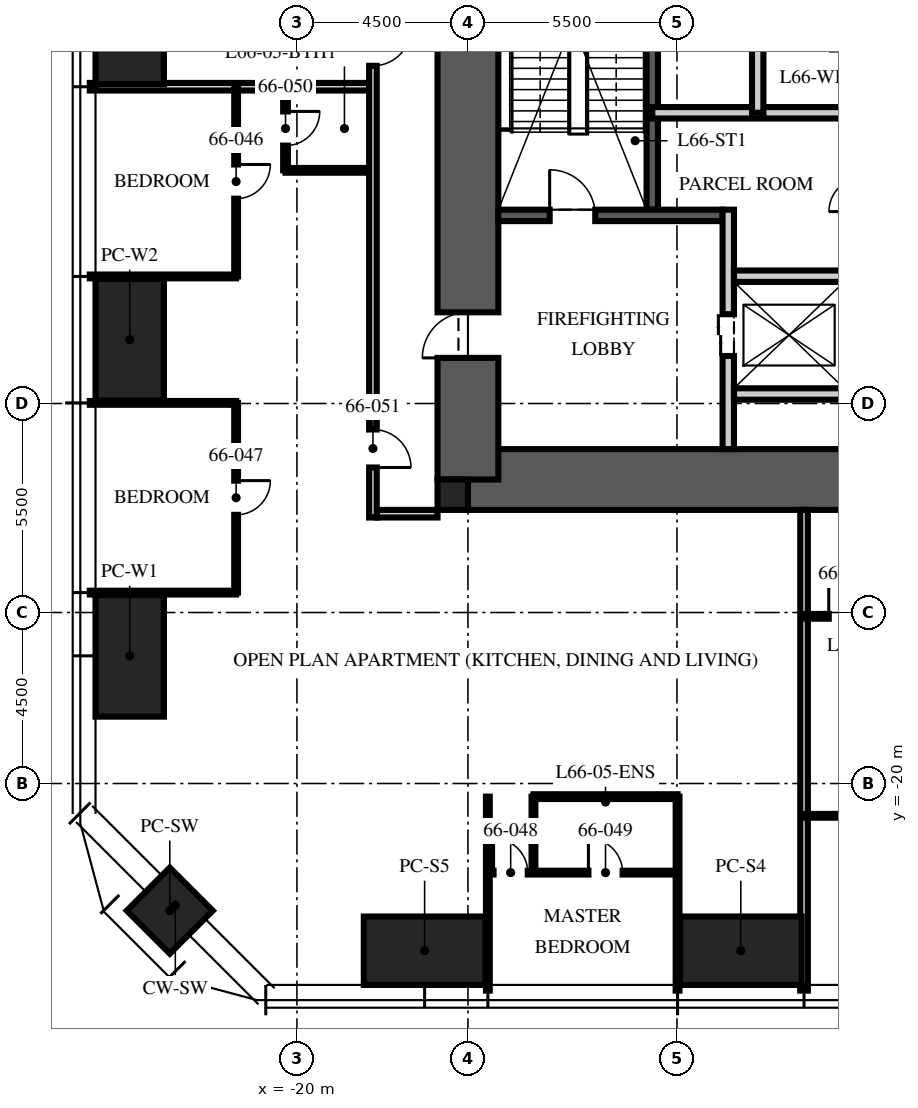
"""IFC4 building model, lengths in metres.
Left out: names, types, materials, properties, quantities, classifications, styles, units other than length and angle.
Written with IfcOpenShell. Run it as: python <this file> out.ifc"""

import sys

from ifc_helpers import new_model, si_unit, direction, frame, frame_2d, origin, origin_2d, place, context, subcontext, project, spatial, rectangle, hollow_rectangle, extrude, element, fill, save


model = new_model("IFC4")
c1 = context("Model", 3, precision=1e-05, world=origin(), true_north=direction((0.0, 1.0)))
c2 = subcontext(c1, "Body", "Model", "MODEL_VIEW")
j1 = project(units=[si_unit("LENGTHUNIT", "METRE"), si_unit("PLANEANGLEUNIT", "RADIAN")], contexts=[c1])
p1 = place(None, origin())
s1 = spatial("IfcSite", under=j1, at=p1, CompositionType="ELEMENT")
p2 = place(p1, origin())
s2 = spatial("IfcBuilding", under=s1, at=p2, CompositionType="ELEMENT")
p3 = place(p2, frame((0.0, 0.0, 263.25)))
s3 = spatial("IfcBuildingStorey", under=s2, at=p3, CompositionType="ELEMENT", Elevation=263.25)
p4 = place(p3, frame((-15.5, -12.0, -0.25), z_axis=(0.0, 0.0, 1.0), x_axis=(1.0, 0.0, 0.0)))
e1 = element("IfcWall", 1, at=p4, inside=s3, PredefinedType="SHEAR", context=c2, shape_type="SweptSolid", body=[
    extrude(rectangle(XDim=31.0, YDim=1.6, at=frame_2d((15.5, 0.0))), origin(), (0.0, 0.0, 1.0), 3.75),
])
p5 = place(p3, frame((-15.5, -12.0, -0.25), z_axis=(0.0, 0.0, 1.0), x_axis=(0.0, 1.0, 0.0)))
e2 = element("IfcWall", 2, at=p5, inside=s3, PredefinedType="SHEAR", context=c2, shape_type="SweptSolid", body=[
    extrude(rectangle(XDim=24.0, YDim=1.6, at=frame_2d((12.0, 0.0))), origin(), (0.0, 0.0, 1.0), 3.75),
])
p6 = place(p5, frame((3.2, 0.0, 0.25)))
e3 = element("IfcOpeningElement", 3, at=p6, cuts=e2, PredefinedType="OPENING", context=c2, shape_type="SweptSolid", body=[
    extrude(rectangle(XDim=1.2, YDim=2.1, at=frame_2d((0.6, 1.05))), frame((0.0, 0.81, 0.0), z_axis=(0.0, -1.0, 0.0), x_axis=(1.0, 0.0, 0.0)), (0.0, 0.0, 1.0), 1.62),
])
p7 = place(p5, frame((19.3, 0.0, 0.25)))
e4 = element("IfcOpeningElement", 4, at=p7, cuts=e2, PredefinedType="OPENING", context=c2, shape_type="SweptSolid", body=[
    extrude(rectangle(XDim=1.8, YDim=2.1, at=frame_2d((0.9, 1.05))), frame((0.0, 0.81, 0.0), z_axis=(0.0, -1.0, 0.0), x_axis=(1.0, 0.0, 0.0)), (0.0, 0.0, 1.0), 1.62),
])
p8 = place(p3, frame((-15.9, -12.4, -0.25), z_axis=(0.0, 0.0, 1.0), x_axis=(1.0, 0.0, 0.0)))
e5 = element("IfcColumn", 5, at=p8, inside=s3, PredefinedType="COLUMN", context=c2, shape_type="SweptSolid", body=[
    extrude(rectangle(XDim=0.8, YDim=0.8, at=origin_2d()), origin(), (0.0, 0.0, 1.0), 3.75),
])
for number, where, z_axis, x_axis in (
    (6, (-8.32, -24.4, 0.0), (0.0, 0.0, 1.0), (1.0, 0.0, 0.0)),
    (7, (-16.64, -24.4, 0.0), (0.0, 0.0, 1.0), (1.0, 0.0, 0.0)),
    (8, (-24.4, -16.64, 0.0), (0.0, 0.0, 1.0), (0.0, 1.0, 0.0)),
    (9, (-24.4, -8.32, 0.0), (0.0, 0.0, 1.0), (0.0, 1.0, 0.0)),
    (10, (-24.4, 0.0, 0.0), (0.0, 0.0, 1.0), (0.0, 1.0, 0.0)),
):
    element("IfcColumn", number, at=place(p3, frame(where, z_axis=z_axis, x_axis=x_axis)), inside=s3, PredefinedType="COLUMN", context=c2, shape_type="SweptSolid", body=[
        extrude(hollow_rectangle(XDim=3.2, YDim=1.8, WallThickness=0.14, at=origin_2d()), origin(), (0.0, 0.0, 1.0), 3.75),
    ])
p9 = place(p3, frame((-23.346, -23.346, 0.0), z_axis=(0.0, 0.0, 1.0), x_axis=(0.707106781187, -0.707106781187, 0.0)))
e11 = element("IfcColumn", 11, at=p9, inside=s3, PredefinedType="COLUMN", context=c2, shape_type="SweptSolid", body=[
    extrude(hollow_rectangle(XDim=1.6, YDim=1.6, WallThickness=0.1, at=origin_2d()), origin(), (0.0, 0.0, 1.0), 3.75),
])
p10 = place(p3, frame((-10.65, -4.9, 0.0), z_axis=(0.0, 0.0, 1.0), x_axis=(0.0, 1.0, 0.0)))
e12 = element("IfcWall", 12, at=p10, inside=s3, PredefinedType="SOLIDWALL", context=c2, shape_type="SweptSolid", body=[
    extrude(rectangle(XDim=10.1, YDim=0.3, at=frame_2d((5.05, 0.0))), origin(), (0.0, 0.0, 1.0), 3.5),
])
p11 = place(p3, frame((-14.7, -5.05, 0.0), z_axis=(0.0, 0.0, 1.0), x_axis=(1.0, 0.0, 0.0)))
e13 = element("IfcWall", 13, at=p11, inside=s3, PredefinedType="SOLIDWALL", context=c2, shape_type="SweptSolid", body=[
    extrude(rectangle(XDim=5.9, YDim=0.3, at=frame_2d((2.95, 0.0))), origin(), (0.0, 0.0, 1.0), 3.5),
])
p12 = place(p11, frame((1.35, 0.0, 0.0)))
e14 = element("IfcOpeningElement", 14, at=p12, cuts=e13, PredefinedType="OPENING", context=c2, shape_type="SweptSolid", body=[
    extrude(rectangle(XDim=1.2, YDim=2.1, at=frame_2d((0.6, 1.05))), frame((0.0, 0.16, 0.0), z_axis=(0.0, -1.0, 0.0), x_axis=(1.0, 0.0, 0.0)), (0.0, 0.0, 1.0), 0.32),
])
p13 = place(p3, frame((-8.65, -11.2, 0.0), z_axis=(0.0, 0.0, 1.0), x_axis=(0.0, 1.0, 0.0)))
e15 = element("IfcWall", 15, at=p13, inside=s3, PredefinedType="PARTITIONING", context=c2, shape_type="SweptSolid", body=[
    extrude(rectangle(XDim=6.3, YDim=0.3, at=frame_2d((3.15, 0.0))), origin(), (0.0, 0.0, 1.0), 3.5),
])
p14 = place(p13, frame((2.45, 0.0, 0.0)))
e16 = element("IfcOpeningElement", 16, at=p14, cuts=e15, PredefinedType="OPENING", context=c2, shape_type="SweptSolid", body=[
    extrude(rectangle(XDim=1.1, YDim=2.1, at=frame_2d((0.55, 1.05))), frame((0.0, 0.16, 0.0), z_axis=(0.0, -1.0, 0.0), x_axis=(1.0, 0.0, 0.0)), (0.0, 0.0, 1.0), 0.32),
])
p15 = place(p3, frame((-8.5, -6.65, 0.0), z_axis=(0.0, 0.0, 1.0), x_axis=(1.0, 0.0, 0.0)))
e17 = element("IfcWall", 17, at=p15, inside=s3, PredefinedType="PARTITIONING", context=c2, shape_type="SweptSolid", body=[
    extrude(rectangle(XDim=17.0, YDim=0.3, at=frame_2d((8.5, 0.0))), origin(), (0.0, 0.0, 1.0), 3.5),
])
p16 = place(p15, frame((7.8, 0.0, 0.0)))
e18 = element("IfcOpeningElement", 18, at=p16, cuts=e17, PredefinedType="OPENING", context=c2, shape_type="SweptSolid", body=[
    extrude(rectangle(XDim=1.3, YDim=2.4, at=frame_2d((0.65, 1.2))), frame((0.0, 0.16, 0.0), z_axis=(0.0, -1.0, 0.0), x_axis=(1.0, 0.0, 0.0)), (0.0, 0.0, 1.0), 0.32),
])
p17 = place(p15, frame((5.65, 0.0, 0.0)))
e19 = element("IfcOpeningElement", 19, at=p17, cuts=e17, PredefinedType="OPENING", context=c2, shape_type="SweptSolid", body=[
    extrude(rectangle(XDim=0.9, YDim=2.1, at=frame_2d((0.45, 1.05))), frame((0.0, 0.16, 0.0), z_axis=(0.0, -1.0, 0.0), x_axis=(1.0, 0.0, 0.0)), (0.0, 0.0, 1.0), 0.32),
])
p18 = place(p15, frame((10.4, 0.0, 0.0)))
e20 = element("IfcOpeningElement", 20, at=p18, cuts=e17, PredefinedType="OPENING", context=c2, shape_type="SweptSolid", body=[
    extrude(rectangle(XDim=0.9, YDim=2.1, at=frame_2d((0.45, 1.05))), frame((0.0, 0.16, 0.0), z_axis=(0.0, -1.0, 0.0), x_axis=(1.0, 0.0, 0.0)), (0.0, 0.0, 1.0), 0.32),
])
p19 = place(p3, frame((-8.5, -9.75, 0.0), z_axis=(0.0, 0.0, 1.0), x_axis=(1.0, 0.0, 0.0)))
e21 = element("IfcWall", 21, at=p19, inside=s3, PredefinedType="PARTITIONING", context=c2, shape_type="SweptSolid", body=[
    extrude(rectangle(XDim=2.9, YDim=0.3, at=frame_2d((1.45, 0.0))), origin(), (0.0, 0.0, 1.0), 3.5),
])
p20 = place(p3, frame((-10.65, -2.35, 0.0), z_axis=(0.0, 0.0, 1.0), x_axis=(1.0, 0.0, 0.0)))
e22 = element("IfcWall", 22, at=p20, inside=s3, PredefinedType="PARTITIONING", context=c2, shape_type="SweptSolid", body=[
    extrude(rectangle(XDim=5.55, YDim=0.3, at=frame_2d((2.775, 0.0))), origin(), (0.0, 0.0, 1.0), 3.5),
])
p21 = place(p3, frame((-7.875, -2.35, 0.0), z_axis=(0.0, 0.0, 1.0), x_axis=(0.0, 1.0, 0.0)))
e23 = element("IfcWall", 23, at=p21, inside=s3, PredefinedType="PARTITIONING", context=c2, shape_type="SweptSolid", body=[
    extrude(rectangle(XDim=4.15, YDim=0.3, at=frame_2d((2.075, 0.0))), origin(), (0.0, 0.0, 1.0), 3.5),
])
p22 = place(p3, frame((-16.3, -12.9, 0.0), z_axis=(0.0, 0.0, 1.0), x_axis=(-1.0, 0.0, 0.0)))
e24 = element("IfcWall", 24, at=p22, inside=s3, PredefinedType="PARTITIONING", context=c2, shape_type="SweptSolid", body=[
    extrude(rectangle(XDim=1.6, YDim=0.2, at=frame_2d((0.8, 0.0))), origin(), (0.0, 0.0, 1.0), 2.3),
])
p23 = place(p3, frame((-18.1, -1.664, 0.0), z_axis=(0.0, 0.0, 1.0), x_axis=(-1.0, 0.0, 0.0)))
e25 = element("IfcWall", 25, at=p23, inside=s3, PredefinedType="PARTITIONING", context=c2, shape_type="SweptSolid", body=[
    extrude(rectangle(XDim=7.35, YDim=0.2, at=frame_2d((3.675, 0.0))), origin(), (0.0, 0.0, 1.0), 2.91),
])
for number, where, z_axis, x_axis in (
    (26, (-21.6, -6.656, 0.0), (0.0, 0.0, 1.0), (-1.0, 0.0, 0.0)),
    (27, (-21.6, -9.984, 0.0), (0.0, 0.0, 1.0), (-1.0, 0.0, 0.0)),
    (28, (-21.6, -14.976, 0.0), (0.0, 0.0, 1.0), (-1.0, 0.0, 0.0)),
):
    element("IfcWall", number, at=place(p3, frame(where, z_axis=z_axis, x_axis=x_axis)), inside=s3, PredefinedType="PARTITIONING", context=c2, shape_type="SweptSolid", body=[
        extrude(rectangle(XDim=3.85, YDim=0.1, at=frame_2d((1.925, 0.0))), origin(), (0.0, 0.0, 1.0), 2.91),
    ])
for number, where, z_axis, x_axis in (
    (29, (-14.976, -20.345, 0.0), (0.0, 0.0, 1.0), (0.0, -1.0, 0.0)),
    (30, (-9.984, -20.345, 0.0), (0.0, 0.0, 1.0), (0.0, -1.0, 0.0)),
):
    element("IfcWall", number, at=place(p3, frame(where, z_axis=z_axis, x_axis=x_axis)), inside=s3, PredefinedType="PARTITIONING", context=c2, shape_type="SweptSolid", body=[
        extrude(rectangle(XDim=5.105, YDim=0.1, at=frame_2d((2.552, 0.0))), origin(), (0.0, 0.0, 1.0), 2.91),
    ])
p24 = place(p3, frame((-6.656, -12.8, 0.0), z_axis=(0.0, 0.0, 1.0), x_axis=(0.0, -1.0, 0.0)))
e31 = element("IfcWall", 31, at=p24, inside=s3, PredefinedType="PARTITIONING", context=c2, shape_type="SweptSolid", body=[
    extrude(rectangle(XDim=12.65, YDim=0.2, at=frame_2d((6.325, 0.0))), origin(), (0.0, 0.0, 1.0), 2.91),
])
p25 = place(p3, frame((-21.6, -1.664, 0.0), z_axis=(0.0, 0.0, 1.0), x_axis=(0.0, -1.0, 0.0)))
e32 = element("IfcWall", 32, at=p25, inside=s3, PredefinedType="PARTITIONING", context=c2, shape_type="SweptSolid", body=[
    extrude(rectangle(XDim=4.992, YDim=0.1, at=frame_2d((2.496, 0.0))), origin(), (0.0, 0.0, 1.0), 2.81),
])
p26 = place(p25, frame((2.046, 0.0, 0.0)))
e33 = element("IfcOpeningElement", 33, at=p26, cuts=e32, PredefinedType="OPENING", context=c2, shape_type="SweptSolid", body=[
    extrude(rectangle(XDim=0.9, YDim=2.1, at=frame_2d((0.45, 1.05))), frame((0.0, 0.06, 0.0), z_axis=(0.0, -1.0, 0.0), x_axis=(1.0, 0.0, 0.0)), (0.0, 0.0, 1.0), 0.12),
])
p27 = place(p3, frame((-21.6, -9.984, 0.0), z_axis=(0.0, 0.0, 1.0), x_axis=(0.0, -1.0, 0.0)))
e34 = element("IfcWall", 34, at=p27, inside=s3, PredefinedType="PARTITIONING", context=c2, shape_type="SweptSolid", body=[
    extrude(rectangle(XDim=4.992, YDim=0.1, at=frame_2d((2.496, 0.0))), origin(), (0.0, 0.0, 1.0), 2.81),
])
p28 = place(p27, frame((2.046, 0.0, 0.0)))
e35 = element("IfcOpeningElement", 35, at=p28, cuts=e34, PredefinedType="OPENING", context=c2, shape_type="SweptSolid", body=[
    extrude(rectangle(XDim=0.9, YDim=2.1, at=frame_2d((0.45, 1.05))), frame((0.0, 0.06, 0.0), z_axis=(0.0, -1.0, 0.0), x_axis=(1.0, 0.0, 0.0)), (0.0, 0.0, 1.0), 0.12),
])
p29 = place(p3, frame((-14.976, -22.345, 0.0), z_axis=(0.0, 0.0, 1.0), x_axis=(1.0, 0.0, 0.0)))
e36 = element("IfcWall", 36, at=p29, inside=s3, PredefinedType="PARTITIONING", context=c2, shape_type="SweptSolid", body=[
    extrude(rectangle(XDim=4.992, YDim=0.1, at=frame_2d((2.496, 0.0))), origin(), (0.0, 0.0, 1.0), 2.81),
])
p30 = place(p29, frame((0.15, 0.0, 0.0)))
e37 = element("IfcOpeningElement", 37, at=p30, cuts=e36, PredefinedType="OPENING", context=c2, shape_type="SweptSolid", body=[
    extrude(rectangle(XDim=0.9, YDim=2.1, at=frame_2d((0.45, 1.05))), frame((0.0, 0.06, 0.0), z_axis=(0.0, -1.0, 0.0), x_axis=(1.0, 0.0, 0.0)), (0.0, 0.0, 1.0), 0.12),
])
p31 = place(p29, frame((2.646, 0.0, 0.0)))
e38 = element("IfcOpeningElement", 38, at=p31, cuts=e36, PredefinedType="OPENING", context=c2, shape_type="SweptSolid", body=[
    extrude(rectangle(XDim=0.9, YDim=2.1, at=frame_2d((0.45, 1.05))), frame((0.0, 0.06, 0.0), z_axis=(0.0, -1.0, 0.0), x_axis=(1.0, 0.0, 0.0)), (0.0, 0.0, 1.0), 0.12),
])
p32 = place(p3, frame((-13.776, -20.345, 0.0), z_axis=(0.0, 0.0, 1.0), x_axis=(0.0, -1.0, 0.0)))
e39 = element("IfcWall", 39, at=p32, inside=s3, PredefinedType="PARTITIONING", context=c2, shape_type="SweptSolid", body=[
    extrude(rectangle(XDim=2.0, YDim=0.1, at=frame_2d((1.0, 0.0))), origin(), (0.0, 0.0, 1.0), 3.5),
])
p33 = place(p3, frame((-13.776, -20.345, 0.0), z_axis=(0.0, 0.0, 1.0), x_axis=(1.0, 0.0, 0.0)))
e40 = element("IfcWall", 40, at=p33, inside=s3, PredefinedType="PARTITIONING", context=c2, shape_type="SweptSolid", body=[
    extrude(rectangle(XDim=3.792, YDim=0.125, at=frame_2d((1.896, 0.0))), origin(), (0.0, 0.0, 1.0), 2.81),
])
p34 = place(p3, frame((-20.3, -1.664, 0.0), z_axis=(0.0, 0.0, 1.0), x_axis=(0.0, -1.0, 0.0)))
e41 = element("IfcWall", 41, at=p34, inside=s3, PredefinedType="PARTITIONING", context=c2, shape_type="SweptSolid", body=[
    extrude(rectangle(XDim=2.2, YDim=0.125, at=frame_2d((1.1, 0.0))), origin(), (0.0, 0.0, 1.0), 3.5),
])
p35 = place(p34, frame((0.65, 0.0, 0.0)))
e42 = element("IfcOpeningElement", 42, at=p35, cuts=e41, PredefinedType="OPENING", context=c2, shape_type="SweptSolid", body=[
    extrude(rectangle(XDim=0.9, YDim=2.1, at=frame_2d((0.45, 1.05))), frame((0.0, 0.073, 0.0), z_axis=(0.0, -1.0, 0.0), x_axis=(1.0, 0.0, 0.0)), (0.0, 0.0, 1.0), 0.145),
])
p36 = place(p3, frame((-18.1, -3.864, 0.0), z_axis=(0.0, 0.0, 1.0), x_axis=(-1.0, 0.0, 0.0)))
e43 = element("IfcWall", 43, at=p36, inside=s3, PredefinedType="PARTITIONING", context=c2, shape_type="SweptSolid", body=[
    extrude(rectangle(XDim=2.2, YDim=0.125, at=frame_2d((1.1, 0.0))), origin(), (0.0, 0.0, 1.0), 3.5),
])
p37 = place(p3, frame((-6.656, -20.85, 0.0), z_axis=(0.0, 0.0, 1.0), x_axis=(1.0, 0.0, 0.0)))
e44 = element("IfcWall", 44, at=p37, inside=s3, PredefinedType="PARTITIONING", context=c2, shape_type="SweptSolid", body=[
    extrude(rectangle(XDim=4.992, YDim=0.1, at=frame_2d((2.496, 0.0))), origin(), (0.0, 0.0, 1.0), 2.81),
])
p38 = place(p37, frame((2.046, 0.0, 0.0)))
e45 = element("IfcOpeningElement", 45, at=p38, cuts=e44, PredefinedType="OPENING", context=c2, shape_type="SweptSolid", body=[
    extrude(rectangle(XDim=0.9, YDim=2.1, at=frame_2d((0.45, 1.05))), frame((0.0, 0.06, 0.0), z_axis=(0.0, -1.0, 0.0), x_axis=(1.0, 0.0, 0.0)), (0.0, 0.0, 1.0), 0.12),
])
p39 = place(p3, frame((-6.656, -15.6, 0.0), z_axis=(0.0, 0.0, 1.0), x_axis=(1.0, 0.0, 0.0)))
e46 = element("IfcWall", 46, at=p39, inside=s3, PredefinedType="PARTITIONING", context=c2, shape_type="SweptSolid", body=[
    extrude(rectangle(XDim=6.2, YDim=0.125, at=frame_2d((3.1, 0.0))), origin(), (0.0, 0.0, 1.0), 2.81),
])
p40 = place(p39, frame((0.65, 0.0, 0.0)))
e47 = element("IfcOpeningElement", 47, at=p40, cuts=e46, PredefinedType="OPENING", context=c2, shape_type="SweptSolid", body=[
    extrude(rectangle(XDim=0.9, YDim=2.1, at=frame_2d((0.45, 1.05))), frame((0.0, 0.073, 0.0), z_axis=(0.0, -1.0, 0.0), x_axis=(1.0, 0.0, 0.0)), (0.0, 0.0, 1.0), 0.145),
])
p41 = place(p39, frame((2.85, 0.0, 0.0)))
e48 = element("IfcOpeningElement", 48, at=p41, cuts=e46, PredefinedType="OPENING", context=c2, shape_type="SweptSolid", body=[
    extrude(rectangle(XDim=0.9, YDim=2.1, at=frame_2d((0.45, 1.05))), frame((0.0, 0.073, 0.0), z_axis=(0.0, -1.0, 0.0), x_axis=(1.0, 0.0, 0.0)), (0.0, 0.0, 1.0), 0.145),
])
p42 = place(p39, frame((4.85, 0.0, 0.0)))
e49 = element("IfcOpeningElement", 49, at=p42, cuts=e46, PredefinedType="OPENING", context=c2, shape_type="SweptSolid", body=[
    extrude(rectangle(XDim=0.9, YDim=2.1, at=frame_2d((0.45, 1.05))), frame((0.0, 0.073, 0.0), z_axis=(0.0, -1.0, 0.0), x_axis=(1.0, 0.0, 0.0)), (0.0, 0.0, 1.0), 0.145),
])
p43 = place(p3, frame((-18.0, 12.8, 0.0), z_axis=(0.0, 0.0, 1.0), x_axis=(0.0, -1.0, 0.0)))
e50 = element("IfcWall", 50, at=p43, inside=s3, PredefinedType="PARTITIONING", context=c2, shape_type="SweptSolid", body=[
    extrude(rectangle(XDim=25.8, YDim=0.2, at=frame_2d((12.9, 0.0))), origin(), (0.0, 0.0, 1.0), 2.6),
])
p44 = place(p43, frame((4.4, 0.0, 0.0)))
e51 = element("IfcOpeningElement", 51, at=p44, cuts=e50, PredefinedType="OPENING", context=c2, shape_type="SweptSolid", body=[
    extrude(rectangle(XDim=1.0, YDim=2.2, at=frame_2d((0.5, 1.1))), frame((0.0, 0.11, 0.0), z_axis=(0.0, -1.0, 0.0), x_axis=(1.0, 0.0, 0.0)), (0.0, 0.0, 1.0), 0.22),
])
p45 = place(p43, frame((12.914, 0.0, 0.0)))
e52 = element("IfcOpeningElement", 52, at=p45, cuts=e50, PredefinedType="OPENING", context=c2, shape_type="SweptSolid", body=[
    extrude(rectangle(XDim=1.0, YDim=2.2, at=frame_2d((0.5, 1.1))), frame((0.0, 0.11, 0.0), z_axis=(0.0, -1.0, 0.0), x_axis=(1.0, 0.0, 0.0)), (0.0, 0.0, 1.0), 0.22),
])
p46 = place(p43, frame((23.484, 0.0, 0.0)))
e53 = element("IfcOpeningElement", 53, at=p46, cuts=e50, PredefinedType="OPENING", context=c2, shape_type="SweptSolid", body=[
    extrude(rectangle(XDim=1.0, YDim=2.2, at=frame_2d((0.5, 1.1))), frame((0.0, 0.11, 0.0), z_axis=(0.0, -1.0, 0.0), x_axis=(1.0, 0.0, 0.0)), (0.0, 0.0, 1.0), 0.22),
])
p47 = place(p12, origin())
e54 = element("IfcDoor", 54, at=p47, inside=s3, OperationType="SINGLE_SWING_LEFT", PredefinedType="DOOR", context=c2, shape_type="SweptSolid", body=[
    extrude(rectangle(XDim=1.2, YDim=2.1, at=frame_2d((0.6, 1.05))), frame((0.0, 0.025, 0.0), z_axis=(0.0, -1.0, 0.0), x_axis=(1.0, 0.0, 0.0)), (0.0, 0.0, 1.0), 0.05),
])
fill(e14, e54)
p48 = place(p6, origin())
e55 = element("IfcDoor", 55, at=p48, inside=s3, OperationType="SINGLE_SWING_LEFT", PredefinedType="DOOR", context=c2, shape_type="SweptSolid", body=[
    extrude(rectangle(XDim=1.2, YDim=2.1, at=frame_2d((0.6, 1.05))), frame((0.0, 0.025, 0.0), z_axis=(0.0, -1.0, 0.0), x_axis=(1.0, 0.0, 0.0)), (0.0, 0.0, 1.0), 0.05),
])
fill(e3, e55)
p49 = place(p14, origin())
e56 = element("IfcDoor", 56, at=p49, inside=s3, OperationType="DOUBLE_DOOR_SLIDING", PredefinedType="DOOR", context=c2, shape_type="SweptSolid", body=[
    extrude(rectangle(XDim=1.1, YDim=2.1, at=frame_2d((0.55, 1.05))), frame((0.0, 0.025, 0.0), z_axis=(0.0, -1.0, 0.0), x_axis=(1.0, 0.0, 0.0)), (0.0, 0.0, 1.0), 0.05),
])
fill(e16, e56)
p50 = place(p45, origin())
e57 = element("IfcDoor", 57, at=p50, inside=s3, OperationType="SINGLE_SWING_LEFT", PredefinedType="DOOR", context=c2, shape_type="SweptSolid", body=[
    extrude(rectangle(XDim=1.0, YDim=2.2, at=frame_2d((0.5, 1.1))), frame((0.0, 0.025, 0.0), z_axis=(0.0, -1.0, 0.0), x_axis=(1.0, 0.0, 0.0)), (0.0, 0.0, 1.0), 0.05),
])
fill(e52, e57)
p51 = place(p26, origin())
e58 = element("IfcDoor", 58, at=p51, inside=s3, OperationType="SINGLE_SWING_LEFT", PredefinedType="DOOR", context=c2, shape_type="SweptSolid", body=[
    extrude(rectangle(XDim=0.9, YDim=2.1, at=frame_2d((0.45, 1.05))), frame((0.0, 0.025, 0.0), z_axis=(0.0, -1.0, 0.0), x_axis=(1.0, 0.0, 0.0)), (0.0, 0.0, 1.0), 0.05),
])
fill(e33, e58)
p52 = place(p28, origin())
e59 = element("IfcDoor", 59, at=p52, inside=s3, OperationType="SINGLE_SWING_LEFT", PredefinedType="DOOR", context=c2, shape_type="SweptSolid", body=[
    extrude(rectangle(XDim=0.9, YDim=2.1, at=frame_2d((0.45, 1.05))), frame((0.0, 0.025, 0.0), z_axis=(0.0, -1.0, 0.0), x_axis=(1.0, 0.0, 0.0)), (0.0, 0.0, 1.0), 0.05),
])
fill(e35, e59)
p53 = place(p30, origin())
e60 = element("IfcDoor", 60, at=p53, inside=s3, OperationType="SINGLE_SWING_LEFT", PredefinedType="DOOR", context=c2, shape_type="SweptSolid", body=[
    extrude(rectangle(XDim=0.9, YDim=2.1, at=frame_2d((0.45, 1.05))), frame((0.0, 0.025, 0.0), z_axis=(0.0, -1.0, 0.0), x_axis=(1.0, 0.0, 0.0)), (0.0, 0.0, 1.0), 0.05),
])
fill(e37, e60)
p54 = place(p31, origin())
e61 = element("IfcDoor", 61, at=p54, inside=s3, OperationType="SINGLE_SWING_LEFT", PredefinedType="DOOR", context=c2, shape_type="SweptSolid", body=[
    extrude(rectangle(XDim=0.9, YDim=2.1, at=frame_2d((0.45, 1.05))), frame((0.0, 0.025, 0.0), z_axis=(0.0, -1.0, 0.0), x_axis=(1.0, 0.0, 0.0)), (0.0, 0.0, 1.0), 0.05),
])
fill(e38, e61)
p55 = place(p35, origin())
e62 = element("IfcDoor", 62, at=p55, inside=s3, OperationType="SINGLE_SWING_LEFT", PredefinedType="DOOR", context=c2, shape_type="SweptSolid", body=[
    extrude(rectangle(XDim=0.9, YDim=2.1, at=frame_2d((0.45, 1.05))), frame((0.0, 0.025, 0.0), z_axis=(0.0, -1.0, 0.0), x_axis=(1.0, 0.0, 0.0)), (0.0, 0.0, 1.0), 0.05),
])
fill(e42, e62)
p56 = place(p46, origin())
e63 = element("IfcDoor", 63, at=p56, inside=s3, OperationType="SINGLE_SWING_RIGHT", PredefinedType="DOOR", context=c2, shape_type="SweptSolid", body=[
    extrude(rectangle(XDim=1.0, YDim=2.2, at=frame_2d((0.5, 1.1))), frame((0.0, 0.025, 0.0), z_axis=(0.0, -1.0, 0.0), x_axis=(1.0, 0.0, 0.0)), (0.0, 0.0, 1.0), 0.05),
])
fill(e53, e63)
p57 = place(p40, origin())
e64 = element("IfcDoor", 64, at=p57, inside=s3, OperationType="SINGLE_SWING_LEFT", PredefinedType="DOOR", context=c2, shape_type="SweptSolid", body=[
    extrude(rectangle(XDim=0.9, YDim=2.1, at=frame_2d((0.45, 1.05))), frame((0.0, 0.025, 0.0), z_axis=(0.0, -1.0, 0.0), x_axis=(1.0, 0.0, 0.0)), (0.0, 0.0, 1.0), 0.05),
])
fill(e47, e64)
save(model, sys.argv[1])
